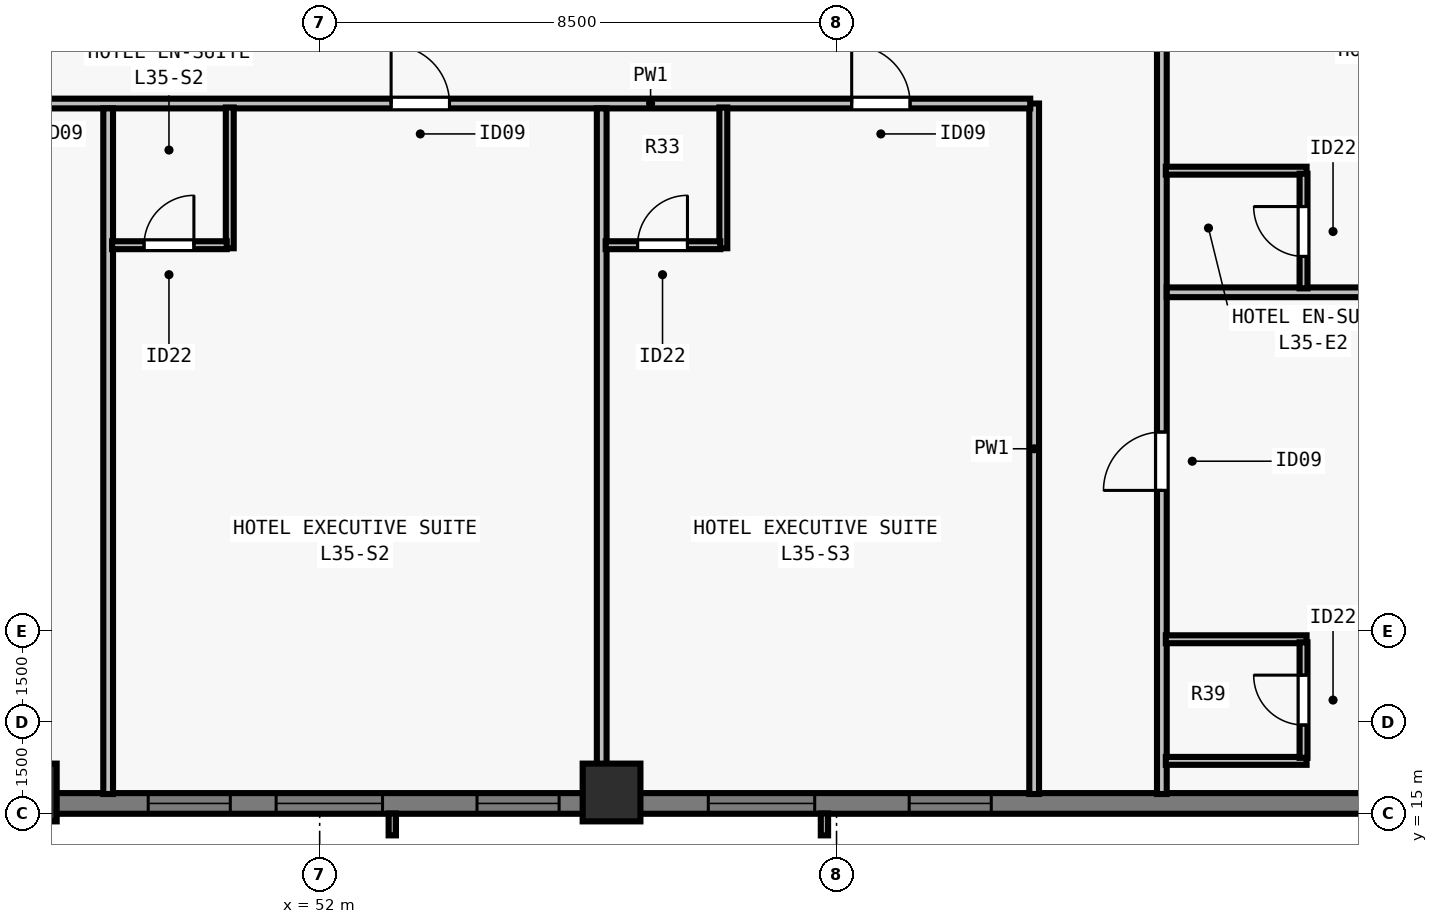
"""IFC4 building model, lengths in metres.
Left out: names, types, materials, properties, quantities, classifications, styles, units other than length and angle.
Written with IfcOpenShell. Run it as: python <this file> out.ifc"""

import sys

from ifc_helpers import new_model, si_unit, direction, frame, frame_2d, origin, origin_2d, place, context, subcontext, project, spatial, rectangle, extrude, element, fill, save


model = new_model("IFC4")
c1 = context("Model", 3, precision=1e-05, world=origin(), true_north=direction((0.0, 1.0)))
c2 = subcontext(c1, "Body", "Model", "MODEL_VIEW")
j1 = project(units=[si_unit("LENGTHUNIT", "METRE"), si_unit("PLANEANGLEUNIT", "RADIAN")], contexts=[c1])
p1 = place(None, origin())
s1 = spatial("IfcSite", under=j1, at=p1, CompositionType="ELEMENT")
p2 = place(p1, origin())
s2 = spatial("IfcBuilding", under=s1, at=p2, CompositionType="ELEMENT")
p3 = place(p2, frame((0.0, 0.0, 130.5)))
s3 = spatial("IfcBuildingStorey", under=s2, at=p3, CompositionType="ELEMENT", Elevation=130.5)
for number, where, z_axis, x_axis in (
    (1, (47.2, 15.35, 0.0), (0.0, 0.0, 1.0), (1.0, 0.0, 0.0)),
    (2, (56.8, 15.35, 0.0), (0.0, 0.0, 1.0), (1.0, 0.0, 0.0)),
):
    element("IfcColumn", number, at=place(p3, frame(where, z_axis=z_axis, x_axis=x_axis)), inside=s3, PredefinedType="COLUMN", context=c2, shape_type="SweptSolid", body=[
        extrude(rectangle(XDim=0.95, YDim=0.95, at=origin_2d()), origin(), (0.0, 0.0, 1.0), 3.5),
    ])
p4 = place(p3, frame((72.0, 15.17, 0.0), z_axis=(0.0, 0.0, 1.0), x_axis=(-1.0, 0.0, 0.0)))
e3 = element("IfcWall", 3, at=p4, inside=s3, PredefinedType="SOLIDWALL", context=c2, shape_type="SweptSolid", body=[
    extrude(rectangle(XDim=39.682, YDim=0.34, at=frame_2d((19.841, 0.0))), origin(), (0.0, 0.0, 1.0), 3.28),
])
p5 = place(p4, frame((8.955, 0.0, 0.8)))
e4 = element("IfcOpeningElement", 4, at=p5, cuts=e3, PredefinedType="OPENING", context=c2, shape_type="SweptSolid", body=[
    extrude(rectangle(XDim=1.35, YDim=1.66, at=frame_2d((0.675, 0.83))), frame((0.0, 0.18, 0.0), z_axis=(0.0, -1.0, 0.0), x_axis=(1.0, 0.0, 0.0)), (0.0, 0.0, 1.0), 0.36),
])
p6 = place(p4, frame((11.859, 0.0, 0.8)))
e5 = element("IfcOpeningElement", 5, at=p6, cuts=e3, PredefinedType="OPENING", context=c2, shape_type="SweptSolid", body=[
    extrude(rectangle(XDim=1.75, YDim=1.66, at=frame_2d((0.875, 0.83))), frame((0.0, 0.18, 0.0), z_axis=(0.0, -1.0, 0.0), x_axis=(1.0, 0.0, 0.0)), (0.0, 0.0, 1.0), 0.36),
])
p7 = place(p4, frame((16.062, 0.0, 0.8)))
e6 = element("IfcOpeningElement", 6, at=p7, cuts=e3, PredefinedType="OPENING", context=c2, shape_type="SweptSolid", body=[
    extrude(rectangle(XDim=1.35, YDim=1.66, at=frame_2d((0.675, 0.83))), frame((0.0, 0.18, 0.0), z_axis=(0.0, -1.0, 0.0), x_axis=(1.0, 0.0, 0.0)), (0.0, 0.0, 1.0), 0.36),
])
p8 = place(p4, frame((18.966, 0.0, 0.8)))
e7 = element("IfcOpeningElement", 7, at=p8, cuts=e3, PredefinedType="OPENING", context=c2, shape_type="SweptSolid", body=[
    extrude(rectangle(XDim=1.75, YDim=1.66, at=frame_2d((0.875, 0.83))), frame((0.0, 0.18, 0.0), z_axis=(0.0, -1.0, 0.0), x_axis=(1.0, 0.0, 0.0)), (0.0, 0.0, 1.0), 0.36),
])
p9 = place(p4, frame((21.469, 0.0, 0.8)))
e8 = element("IfcOpeningElement", 8, at=p9, cuts=e3, PredefinedType="OPENING", context=c2, shape_type="SweptSolid", body=[
    extrude(rectangle(XDim=1.35, YDim=1.66, at=frame_2d((0.675, 0.83))), frame((0.0, 0.18, 0.0), z_axis=(0.0, -1.0, 0.0), x_axis=(1.0, 0.0, 0.0)), (0.0, 0.0, 1.0), 0.36),
])
p10 = place(p4, frame((26.073, 0.0, 0.8)))
e9 = element("IfcOpeningElement", 9, at=p10, cuts=e3, PredefinedType="OPENING", context=c2, shape_type="SweptSolid", body=[
    extrude(rectangle(XDim=1.75, YDim=1.66, at=frame_2d((0.875, 0.83))), frame((0.0, 0.18, 0.0), z_axis=(0.0, -1.0, 0.0), x_axis=(1.0, 0.0, 0.0)), (0.0, 0.0, 1.0), 0.36),
])
p11 = place(p4, frame((28.577, 0.0, 0.8)))
e10 = element("IfcOpeningElement", 10, at=p11, cuts=e3, PredefinedType="OPENING", context=c2, shape_type="SweptSolid", body=[
    extrude(rectangle(XDim=1.35, YDim=1.66, at=frame_2d((0.675, 0.83))), frame((0.0, 0.18, 0.0), z_axis=(0.0, -1.0, 0.0), x_axis=(1.0, 0.0, 0.0)), (0.0, 0.0, 1.0), 0.36),
])
p12 = place(p3, frame((65.85, 15.325, 0.0), z_axis=(0.0, 0.0, 1.0), x_axis=(0.0, 1.0, 0.0)))
e11 = element("IfcWall", 11, at=p12, inside=s3, PredefinedType="PARTITIONING", context=c2, shape_type="SweptSolid", body=[
    extrude(rectangle(XDim=47.35, YDim=0.16, at=frame_2d((23.675, 0.0))), origin(), (0.0, 0.0, 1.0), 2.555),
])
p13 = place(p12, frame((4.993, 0.0, 0.0)))
e12 = element("IfcOpeningElement", 12, at=p13, cuts=e11, PredefinedType="OPENING", context=c2, shape_type="SweptSolid", body=[
    extrude(rectangle(XDim=0.96, YDim=2.15, at=frame_2d((0.48, 1.075))), frame((0.0, 0.09, 0.0), z_axis=(0.0, -1.0, 0.0), x_axis=(1.0, 0.0, 0.0)), (0.0, 0.0, 1.0), 0.18),
])
p14 = place(p12, frame((12.525, 0.0, 0.0)))
e13 = element("IfcOpeningElement", 13, at=p14, cuts=e11, PredefinedType="OPENING", context=c2, shape_type="SweptSolid", body=[
    extrude(rectangle(XDim=0.96, YDim=2.15, at=frame_2d((0.48, 1.075))), frame((0.0, 0.09, 0.0), z_axis=(0.0, -1.0, 0.0), x_axis=(1.0, 0.0, 0.0)), (0.0, 0.0, 1.0), 0.18),
])
p15 = place(p12, frame((20.385, 0.0, 0.0)))
e14 = element("IfcOpeningElement", 14, at=p15, cuts=e11, PredefinedType="OPENING", context=c2, shape_type="SweptSolid", body=[
    extrude(rectangle(XDim=0.96, YDim=2.15, at=frame_2d((0.48, 1.075))), frame((0.0, 0.09, 0.0), z_axis=(0.0, -1.0, 0.0), x_axis=(1.0, 0.0, 0.0)), (0.0, 0.0, 1.0), 0.18),
])
p16 = place(p12, frame((28.246, 0.0, 0.0)))
e15 = element("IfcOpeningElement", 15, at=p16, cuts=e11, PredefinedType="OPENING", context=c2, shape_type="SweptSolid", body=[
    extrude(rectangle(XDim=0.96, YDim=2.15, at=frame_2d((0.48, 1.075))), frame((0.0, 0.09, 0.0), z_axis=(0.0, -1.0, 0.0), x_axis=(1.0, 0.0, 0.0)), (0.0, 0.0, 1.0), 0.18),
])
p17 = place(p12, frame((36.105, 0.0, 0.0)))
e16 = element("IfcOpeningElement", 16, at=p17, cuts=e11, PredefinedType="OPENING", context=c2, shape_type="SweptSolid", body=[
    extrude(rectangle(XDim=0.96, YDim=2.15, at=frame_2d((0.48, 1.075))), frame((0.0, 0.09, 0.0), z_axis=(0.0, -1.0, 0.0), x_axis=(1.0, 0.0, 0.0)), (0.0, 0.0, 1.0), 0.18),
])
p18 = place(p12, frame((44.068, 0.0, 0.0)))
e17 = element("IfcOpeningElement", 17, at=p18, cuts=e11, PredefinedType="OPENING", context=c2, shape_type="SweptSolid", body=[
    extrude(rectangle(XDim=0.96, YDim=2.15, at=frame_2d((0.48, 1.075))), frame((0.0, 0.09, 0.0), z_axis=(0.0, -1.0, 0.0), x_axis=(1.0, 0.0, 0.0)), (0.0, 0.0, 1.0), 0.18),
])
p19 = place(p3, frame((63.75, 15.325, 0.0), z_axis=(0.0, 0.0, 1.0), x_axis=(0.0, 1.0, 0.0)))
e18 = element("IfcWall", 18, at=p19, inside=s3, PredefinedType="PARTITIONING", context=c2, shape_type="SweptSolid", body=[
    extrude(rectangle(XDim=11.355, YDim=0.16, at=frame_2d((5.677, 0.0))), origin(), (0.0, 0.0, 1.0), 2.555),
])
p20 = place(p3, frame((41.615, 26.68, 0.0), z_axis=(0.0, 0.0, 1.0), x_axis=(1.0, 0.0, 0.0)))
e19 = element("IfcWall", 19, at=p20, inside=s3, PredefinedType="PARTITIONING", context=c2, shape_type="SweptSolid", body=[
    extrude(rectangle(XDim=22.07, YDim=0.16, at=frame_2d((11.035, 0.0))), origin(), (0.0, 0.0, 1.0), 3.28),
])
p21 = place(p20, frame((4.281, 0.0, 0.0)))
e20 = element("IfcOpeningElement", 20, at=p21, cuts=e19, PredefinedType="OPENING", context=c2, shape_type="SweptSolid", body=[
    extrude(rectangle(XDim=0.96, YDim=2.15, at=frame_2d((0.48, 1.075))), frame((0.0, 0.09, 0.0), z_axis=(0.0, -1.0, 0.0), x_axis=(1.0, 0.0, 0.0)), (0.0, 0.0, 1.0), 0.18),
])
p22 = place(p20, frame((11.56, 0.0, 0.0)))
e21 = element("IfcOpeningElement", 21, at=p22, cuts=e19, PredefinedType="OPENING", context=c2, shape_type="SweptSolid", body=[
    extrude(rectangle(XDim=0.96, YDim=2.15, at=frame_2d((0.48, 1.075))), frame((0.0, 0.09, 0.0), z_axis=(0.0, -1.0, 0.0), x_axis=(1.0, 0.0, 0.0)), (0.0, 0.0, 1.0), 0.18),
])
p23 = place(p20, frame((19.134, 0.0, 0.0)))
e22 = element("IfcOpeningElement", 22, at=p23, cuts=e19, PredefinedType="OPENING", context=c2, shape_type="SweptSolid", body=[
    extrude(rectangle(XDim=0.96, YDim=2.15, at=frame_2d((0.48, 1.075))), frame((0.0, 0.09, 0.0), z_axis=(0.0, -1.0, 0.0), x_axis=(1.0, 0.0, 0.0)), (0.0, 0.0, 1.0), 0.18),
])
p24 = place(p3, frame((48.522, 15.325, 0.0), z_axis=(0.0, 0.0, 1.0), x_axis=(0.0, 1.0, 0.0)))
e23 = element("IfcWall", 23, at=p24, inside=s3, PredefinedType="PARTITIONING", context=c2, shape_type="SweptSolid", body=[
    extrude(rectangle(XDim=11.275, YDim=0.16, at=frame_2d((5.638, 0.0))), origin(), (0.0, 0.0, 1.0), 2.896),
])
p25 = place(p3, frame((50.522, 24.3, 0.0), z_axis=(0.0, 0.0, 1.0), x_axis=(0.0, 1.0, 0.0)))
e24 = element("IfcWall", 24, at=p25, inside=s3, PredefinedType="PLUMBINGWALL", context=c2, shape_type="SweptSolid", body=[
    extrude(rectangle(XDim=2.315, YDim=0.13, at=frame_2d((1.157, 0.0))), origin(), (0.0, 0.0, 1.0), 3.28),
])
p26 = place(p3, frame((48.587, 24.35, 0.0), z_axis=(0.0, 0.0, 1.0), x_axis=(1.0, 0.0, 0.0)))
e25 = element("IfcWall", 25, at=p26, inside=s3, PredefinedType="PLUMBINGWALL", context=c2, shape_type="SweptSolid", body=[
    extrude(rectangle(XDim=1.885, YDim=0.13, at=frame_2d((0.942, 0.0))), origin(), (0.0, 0.0, 1.0), 3.28),
])
p27 = place(p26, frame((0.525, 0.0, 0.0)))
e26 = element("IfcOpeningElement", 26, at=p27, cuts=e25, PredefinedType="OPENING", context=c2, shape_type="SweptSolid", body=[
    extrude(rectangle(XDim=0.82, YDim=2.1, at=frame_2d((0.41, 1.05))), frame((0.0, 0.075, 0.0), z_axis=(0.0, -1.0, 0.0), x_axis=(1.0, 0.0, 0.0)), (0.0, 0.0, 1.0), 0.15),
])
p28 = place(p3, frame((56.638, 15.325, 0.0), z_axis=(0.0, 0.0, 1.0), x_axis=(0.0, 1.0, 0.0)))
e27 = element("IfcWall", 27, at=p28, inside=s3, PredefinedType="PARTITIONING", context=c2, shape_type="SweptSolid", body=[
    extrude(rectangle(XDim=11.275, YDim=0.16, at=frame_2d((5.638, 0.0))), origin(), (0.0, 0.0, 1.0), 2.555),
])
p29 = place(p3, frame((58.638, 24.3, 0.0), z_axis=(0.0, 0.0, 1.0), x_axis=(0.0, 1.0, 0.0)))
e28 = element("IfcWall", 28, at=p29, inside=s3, PredefinedType="PLUMBINGWALL", context=c2, shape_type="SweptSolid", body=[
    extrude(rectangle(XDim=2.315, YDim=0.13, at=frame_2d((1.157, 0.0))), origin(), (0.0, 0.0, 1.0), 3.28),
])
p30 = place(p3, frame((56.703, 24.35, 0.0), z_axis=(0.0, 0.0, 1.0), x_axis=(1.0, 0.0, 0.0)))
e29 = element("IfcWall", 29, at=p30, inside=s3, PredefinedType="PLUMBINGWALL", context=c2, shape_type="SweptSolid", body=[
    extrude(rectangle(XDim=1.885, YDim=0.13, at=frame_2d((0.942, 0.0))), origin(), (0.0, 0.0, 1.0), 3.28),
])
p31 = place(p30, frame((0.525, 0.0, 0.0)))
e30 = element("IfcOpeningElement", 30, at=p31, cuts=e29, PredefinedType="OPENING", context=c2, shape_type="SweptSolid", body=[
    extrude(rectangle(XDim=0.82, YDim=2.1, at=frame_2d((0.41, 1.05))), frame((0.0, 0.075, 0.0), z_axis=(0.0, -1.0, 0.0), x_axis=(1.0, 0.0, 0.0)), (0.0, 0.0, 1.0), 0.15),
])
for number, where, z_axis, x_axis in (
    (31, (65.915, 15.87, 0.0), (0.0, 0.0, 1.0), (1.0, 0.0, 0.0)),
    (32, (65.915, 17.87, 0.0), (0.0, 0.0, 1.0), (1.0, 0.0, 0.0)),
):
    element("IfcWall", number, at=place(p3, frame(where, z_axis=z_axis, x_axis=x_axis)), inside=s3, PredefinedType="PLUMBINGWALL", context=c2, shape_type="SweptSolid", body=[
        extrude(rectangle(XDim=2.315, YDim=0.13, at=frame_2d((1.157, 0.0))), origin(), (0.0, 0.0, 1.0), 3.28),
    ])
p32 = place(p3, frame((68.18, 15.92, 0.0), z_axis=(0.0, 0.0, 1.0), x_axis=(0.0, 1.0, 0.0)))
e33 = element("IfcWall", 33, at=p32, inside=s3, PredefinedType="PLUMBINGWALL", context=c2, shape_type="SweptSolid", body=[
    extrude(rectangle(XDim=1.9, YDim=0.13, at=frame_2d((0.95, 0.0))), origin(), (0.0, 0.0, 1.0), 3.28),
])
p33 = place(p32, frame((0.54, 0.0, 0.0)))
e34 = element("IfcOpeningElement", 34, at=p33, cuts=e33, PredefinedType="OPENING", context=c2, shape_type="SweptSolid", body=[
    extrude(rectangle(XDim=0.82, YDim=2.1, at=frame_2d((0.41, 1.05))), frame((0.0, 0.075, 0.0), z_axis=(0.0, -1.0, 0.0), x_axis=(1.0, 0.0, 0.0)), (0.0, 0.0, 1.0), 0.15),
])
p34 = place(p3, frame((65.93, 23.576, 0.0), z_axis=(0.0, 0.0, 1.0), x_axis=(1.0, 0.0, 0.0)))
e35 = element("IfcWall", 35, at=p34, inside=s3, PredefinedType="PARTITIONING", context=c2, shape_type="SweptSolid", body=[
    extrude(rectangle(XDim=9.745, YDim=0.16, at=frame_2d((4.873, 0.0))), origin(), (0.0, 0.0, 1.0), 2.896),
])
p35 = place(p3, frame((65.915, 25.576, 0.0), z_axis=(0.0, 0.0, 1.0), x_axis=(1.0, 0.0, 0.0)))
e36 = element("IfcWall", 36, at=p35, inside=s3, PredefinedType="PLUMBINGWALL", context=c2, shape_type="SweptSolid", body=[
    extrude(rectangle(XDim=2.315, YDim=0.13, at=frame_2d((1.157, 0.0))), origin(), (0.0, 0.0, 1.0), 2.896),
])
p36 = place(p3, frame((68.18, 23.641, 0.0), z_axis=(0.0, 0.0, 1.0), x_axis=(0.0, 1.0, 0.0)))
e37 = element("IfcWall", 37, at=p36, inside=s3, PredefinedType="PLUMBINGWALL", context=c2, shape_type="SweptSolid", body=[
    extrude(rectangle(XDim=1.885, YDim=0.13, at=frame_2d((0.942, 0.0))), origin(), (0.0, 0.0, 1.0), 3.28),
])
p37 = place(p36, frame((0.525, 0.0, 0.0)))
e38 = element("IfcOpeningElement", 38, at=p37, cuts=e37, PredefinedType="OPENING", context=c2, shape_type="SweptSolid", body=[
    extrude(rectangle(XDim=0.82, YDim=2.1, at=frame_2d((0.41, 1.05))), frame((0.0, 0.075, 0.0), z_axis=(0.0, -1.0, 0.0), x_axis=(1.0, 0.0, 0.0)), (0.0, 0.0, 1.0), 0.15),
])
p38 = place(p5, origin())
e39 = element("IfcWindow", 39, at=p38, inside=s3, PartitioningType="SINGLE_PANEL", PredefinedType="WINDOW", context=c2, shape_type="SweptSolid", body=[
    extrude(rectangle(XDim=1.35, YDim=1.66, at=frame_2d((0.675, 0.83))), frame((0.0, -0.05, 0.0), z_axis=(0.0, -1.0, 0.0), x_axis=(1.0, 0.0, 0.0)), (0.0, 0.0, 1.0), 0.06),
])
fill(e4, e39)
p39 = place(p6, origin())
e40 = element("IfcWindow", 40, at=p39, inside=s3, PartitioningType="SINGLE_PANEL", PredefinedType="WINDOW", context=c2, shape_type="SweptSolid", body=[
    extrude(rectangle(XDim=1.75, YDim=1.66, at=frame_2d((0.875, 0.83))), frame((0.0, -0.05, 0.0), z_axis=(0.0, -1.0, 0.0), x_axis=(1.0, 0.0, 0.0)), (0.0, 0.0, 1.0), 0.06),
])
fill(e5, e40)
p40 = place(p7, origin())
e41 = element("IfcWindow", 41, at=p40, inside=s3, PartitioningType="SINGLE_PANEL", PredefinedType="WINDOW", context=c2, shape_type="SweptSolid", body=[
    extrude(rectangle(XDim=1.35, YDim=1.66, at=frame_2d((0.675, 0.83))), frame((0.0, -0.05, 0.0), z_axis=(0.0, -1.0, 0.0), x_axis=(1.0, 0.0, 0.0)), (0.0, 0.0, 1.0), 0.06),
])
fill(e6, e41)
p41 = place(p8, origin())
e42 = element("IfcWindow", 42, at=p41, inside=s3, PartitioningType="SINGLE_PANEL", PredefinedType="WINDOW", context=c2, shape_type="SweptSolid", body=[
    extrude(rectangle(XDim=1.75, YDim=1.66, at=frame_2d((0.875, 0.83))), frame((0.0, -0.05, 0.0), z_axis=(0.0, -1.0, 0.0), x_axis=(1.0, 0.0, 0.0)), (0.0, 0.0, 1.0), 0.06),
])
fill(e7, e42)
p42 = place(p9, origin())
e43 = element("IfcWindow", 43, at=p42, inside=s3, PartitioningType="SINGLE_PANEL", PredefinedType="WINDOW", context=c2, shape_type="SweptSolid", body=[
    extrude(rectangle(XDim=1.35, YDim=1.66, at=frame_2d((0.675, 0.83))), frame((0.0, -0.05, 0.0), z_axis=(0.0, -1.0, 0.0), x_axis=(1.0, 0.0, 0.0)), (0.0, 0.0, 1.0), 0.06),
])
fill(e8, e43)
p43 = place(p27, origin())
e44 = element("IfcDoor", 44, at=p43, inside=s3, OperationType="SINGLE_SWING_RIGHT", PredefinedType="DOOR", context=c2, shape_type="SweptSolid", body=[
    extrude(rectangle(XDim=0.82, YDim=2.1, at=frame_2d((0.41, 1.05))), frame((0.0, 0.025, 0.0), z_axis=(0.0, -1.0, 0.0), x_axis=(1.0, 0.0, 0.0)), (0.0, 0.0, 1.0), 0.05),
])
fill(e26, e44)
p44 = place(p22, origin())
e45 = element("IfcDoor", 45, at=p44, inside=s3, OperationType="SINGLE_SWING_LEFT", PredefinedType="DOOR", context=c2, shape_type="SweptSolid", body=[
    extrude(rectangle(XDim=0.96, YDim=2.15, at=frame_2d((0.48, 1.075))), frame((0.0, 0.025, 0.0), z_axis=(0.0, -1.0, 0.0), x_axis=(1.0, 0.0, 0.0)), (0.0, 0.0, 1.0), 0.05),
])
fill(e21, e45)
p45 = place(p31, origin())
e46 = element("IfcDoor", 46, at=p45, inside=s3, OperationType="SINGLE_SWING_RIGHT", PredefinedType="DOOR", context=c2, shape_type="SweptSolid", body=[
    extrude(rectangle(XDim=0.82, YDim=2.1, at=frame_2d((0.41, 1.05))), frame((0.0, 0.025, 0.0), z_axis=(0.0, -1.0, 0.0), x_axis=(1.0, 0.0, 0.0)), (0.0, 0.0, 1.0), 0.05),
])
fill(e30, e46)
p46 = place(p23, origin())
e47 = element("IfcDoor", 47, at=p46, inside=s3, OperationType="SINGLE_SWING_LEFT", PredefinedType="DOOR", context=c2, shape_type="SweptSolid", body=[
    extrude(rectangle(XDim=0.96, YDim=2.15, at=frame_2d((0.48, 1.075))), frame((0.0, 0.025, 0.0), z_axis=(0.0, -1.0, 0.0), x_axis=(1.0, 0.0, 0.0)), (0.0, 0.0, 1.0), 0.05),
])
fill(e22, e47)
p47 = place(p33, origin())
e48 = element("IfcDoor", 48, at=p47, inside=s3, OperationType="SINGLE_SWING_RIGHT", PredefinedType="DOOR", context=c2, shape_type="SweptSolid", body=[
    extrude(rectangle(XDim=0.82, YDim=2.1, at=frame_2d((0.41, 1.05))), frame((0.0, 0.025, 0.0), z_axis=(0.0, -1.0, 0.0), x_axis=(1.0, 0.0, 0.0)), (0.0, 0.0, 1.0), 0.05),
])
fill(e34, e48)
p48 = place(p13, origin())
e49 = element("IfcDoor", 49, at=p48, inside=s3, OperationType="SINGLE_SWING_LEFT", PredefinedType="DOOR", context=c2, shape_type="SweptSolid", body=[
    extrude(rectangle(XDim=0.96, YDim=2.15, at=frame_2d((0.48, 1.075))), frame((0.0, 0.025, 0.0), z_axis=(0.0, -1.0, 0.0), x_axis=(1.0, 0.0, 0.0)), (0.0, 0.0, 1.0), 0.05),
])
fill(e12, e49)
p49 = place(p37, origin())
e50 = element("IfcDoor", 50, at=p49, inside=s3, OperationType="SINGLE_SWING_RIGHT", PredefinedType="DOOR", context=c2, shape_type="SweptSolid", body=[
    extrude(rectangle(XDim=0.82, YDim=2.1, at=frame_2d((0.41, 1.05))), frame((0.0, 0.025, 0.0), z_axis=(0.0, -1.0, 0.0), x_axis=(1.0, 0.0, 0.0)), (0.0, 0.0, 1.0), 0.05),
])
fill(e38, e50)
save(model, sys.argv[1])
